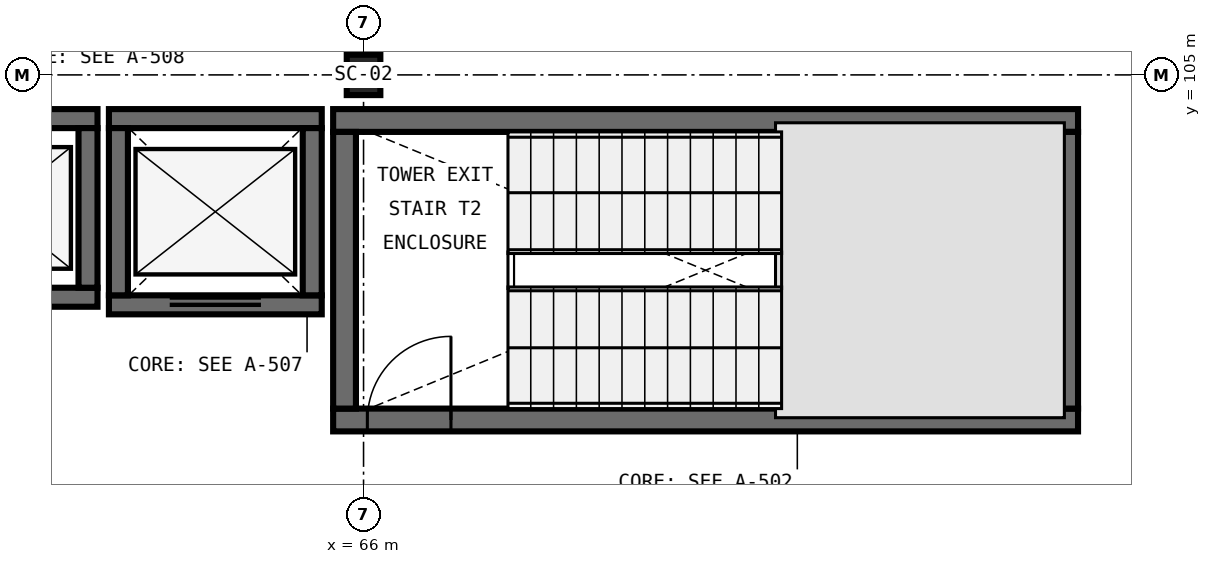
"""IFC4 building model, lengths in metres.
Left out: names, types, materials, properties, quantities, classifications, styles, units other than length and angle.
Written with IfcOpenShell. Run it as: python <this file> out.ifc"""

import sys

from ifc_helpers import new_model, si_unit, direction, frame, frame_2d, origin, origin_2d, place, context, subcontext, project, spatial, rectangle, i_section, extrude, element, fill, save


model = new_model("IFC4")
c1 = context("Model", 3, precision=1e-05, world=origin(), true_north=direction((0.0, 1.0)))
c2 = subcontext(c1, "Body", "Model", "MODEL_VIEW")
j1 = project(units=[si_unit("LENGTHUNIT", "METRE"), si_unit("PLANEANGLEUNIT", "RADIAN")], contexts=[c1])
p1 = place(None, origin())
s1 = spatial("IfcSite", under=j1, at=p1, CompositionType="ELEMENT")
p2 = place(p1, origin())
s2 = spatial("IfcBuilding", under=s1, at=p2, CompositionType="ELEMENT")
p3 = place(p2, frame((0.0, 0.0, 23.4)))
s3 = spatial("IfcBuildingStorey", under=s2, at=p3, CompositionType="ELEMENT", Elevation=23.4)
p4 = place(p3, frame((66.0, 105.0, 0.0), z_axis=(0.0, 0.0, 1.0), x_axis=(1.0, 0.0, 0.0)))
e1 = element("IfcColumn", 1, at=p4, inside=s3, PredefinedType="COLUMN", context=c2, shape_type="SweptSolid", body=[
    extrude(i_section(OverallWidth=0.442, OverallDepth=0.531, WebThickness=0.066, FlangeThickness=0.106, FilletRadius=0.031, at=origin_2d()), origin(), (0.0, 0.0, 1.0), 4.2),
])
p5 = place(p3, frame((65.6, 100.46, 0.0), z_axis=(0.0, 0.0, 1.0), x_axis=(1.0, 0.0, 0.0)))
e2 = element("IfcWall", 2, at=p5, inside=s3, PredefinedType="SHEAR", context=c2, shape_type="SweptSolid", body=[
    extrude(rectangle(XDim=9.8, YDim=0.3, at=frame_2d((4.9, 0.0))), origin(), (0.0, 0.0, 1.0), 4.2),
])
p6 = place(p5, frame((0.45, 0.0, 0.0)))
e3 = element("IfcOpeningElement", 3, at=p6, cuts=e2, PredefinedType="OPENING", context=c2, shape_type="SweptSolid", body=[
    extrude(rectangle(XDim=1.1, YDim=2.2, at=frame_2d((0.55, 1.1))), frame((0.0, 0.165, 0.0), z_axis=(0.0, -1.0, 0.0), x_axis=(1.0, 0.0, 0.0)), (0.0, 0.0, 1.0), 0.33),
])
p7 = place(p3, frame((75.4, 104.4, 0.0), z_axis=(0.0, 0.0, 1.0), x_axis=(-1.0, 0.0, 0.0)))
e4 = element("IfcWall", 4, at=p7, inside=s3, PredefinedType="SHEAR", context=c2, shape_type="SweptSolid", body=[
    extrude(rectangle(XDim=9.8, YDim=0.3, at=frame_2d((4.9, 0.0))), origin(), (0.0, 0.0, 1.0), 4.2),
])
for number, where, z_axis, x_axis in (
    (5, (65.75, 104.25, 0.0), (0.0, 0.0, 1.0), (0.0, -1.0, 0.0)),
    (6, (75.25, 100.61, 0.0), (0.0, 0.0, 1.0), (0.0, 1.0, 0.0)),
):
    element("IfcWall", number, at=place(p3, frame(where, z_axis=z_axis, x_axis=x_axis)), inside=s3, PredefinedType="SHEAR", context=c2, shape_type="SweptSolid", body=[
        extrude(rectangle(XDim=3.64, YDim=0.3, at=frame_2d((1.82, 0.0))), origin(), (0.0, 0.0, 1.0), 4.2),
    ])
p8 = place(p3, frame((62.65, 101.975, 0.0), z_axis=(0.0, 0.0, 1.0), x_axis=(1.0, 0.0, 0.0)))
e7 = element("IfcWall", 7, at=p8, inside=s3, PredefinedType="SHEAR", context=c2, shape_type="SweptSolid", body=[
    extrude(rectangle(XDim=2.8, YDim=0.25, at=frame_2d((1.4, 0.0))), origin(), (0.0, 0.0, 1.0), 4.2),
])
p9 = place(p8, frame((0.8, 0.0, 0.0)))
e8 = element("IfcOpeningElement", 8, at=p9, cuts=e7, PredefinedType="OPENING", context=c2, shape_type="SweptSolid", body=[
    extrude(rectangle(XDim=1.2, YDim=2.2, at=frame_2d((0.6, 1.1))), frame((0.0, 0.14, 0.0), z_axis=(0.0, -1.0, 0.0), x_axis=(1.0, 0.0, 0.0)), (0.0, 0.0, 1.0), 0.28),
])
p10 = place(p3, frame((65.45, 104.425, 0.0), z_axis=(0.0, 0.0, 1.0), x_axis=(-1.0, 0.0, 0.0)))
e9 = element("IfcWall", 9, at=p10, inside=s3, PredefinedType="SHEAR", context=c2, shape_type="SweptSolid", body=[
    extrude(rectangle(XDim=2.8, YDim=0.25, at=frame_2d((1.4, 0.0))), origin(), (0.0, 0.0, 1.0), 4.2),
])
for number, where, z_axis, x_axis in (
    (10, (62.775, 104.3, 0.0), (0.0, 0.0, 1.0), (0.0, -1.0, 0.0)),
    (11, (65.325, 102.1, 0.0), (0.0, 0.0, 1.0), (0.0, 1.0, 0.0)),
):
    element("IfcWall", number, at=place(p3, frame(where, z_axis=z_axis, x_axis=x_axis)), inside=s3, PredefinedType="SHEAR", context=c2, shape_type="SweptSolid", body=[
        extrude(rectangle(XDim=2.2, YDim=0.25, at=frame_2d((1.1, 0.0))), origin(), (0.0, 0.0, 1.0), 4.2),
    ])
p11 = place(p3, frame((59.8, 102.075, 0.0), z_axis=(0.0, 0.0, 1.0), x_axis=(1.0, 0.0, 0.0)))
e12 = element("IfcWall", 12, at=p11, inside=s3, PredefinedType="SHEAR", context=c2, shape_type="SweptSolid", body=[
    extrude(rectangle(XDim=2.7, YDim=0.25, at=frame_2d((1.35, 0.0))), origin(), (0.0, 0.0, 1.0), 4.2),
])
p12 = place(p11, frame((0.8, 0.0, 0.0)))
e13 = element("IfcOpeningElement", 13, at=p12, cuts=e12, PredefinedType="OPENING", context=c2, shape_type="SweptSolid", body=[
    extrude(rectangle(XDim=1.1, YDim=2.2, at=frame_2d((0.55, 1.1))), frame((0.0, 0.14, 0.0), z_axis=(0.0, -1.0, 0.0), x_axis=(1.0, 0.0, 0.0)), (0.0, 0.0, 1.0), 0.28),
])
p13 = place(p3, frame((62.5, 104.425, 0.0), z_axis=(0.0, 0.0, 1.0), x_axis=(-1.0, 0.0, 0.0)))
e14 = element("IfcWall", 14, at=p13, inside=s3, PredefinedType="SHEAR", context=c2, shape_type="SweptSolid", body=[
    extrude(rectangle(XDim=2.7, YDim=0.25, at=frame_2d((1.35, 0.0))), origin(), (0.0, 0.0, 1.0), 4.2),
])
p14 = place(p3, frame((62.375, 102.2, 0.0), z_axis=(0.0, 0.0, 1.0), x_axis=(0.0, 1.0, 0.0)))
e15 = element("IfcWall", 15, at=p14, inside=s3, PredefinedType="SHEAR", context=c2, shape_type="SweptSolid", body=[
    extrude(rectangle(XDim=2.1, YDim=0.25, at=frame_2d((1.05, 0.0))), origin(), (0.0, 0.0, 1.0), 4.2),
])
p15 = place(p6, origin())
e16 = element("IfcDoor", 16, at=p15, inside=s3, OperationType="SINGLE_SWING_RIGHT", PredefinedType="DOOR", context=c2, shape_type="SweptSolid", body=[
    extrude(rectangle(XDim=1.1, YDim=2.2, at=frame_2d((0.55, 1.1))), frame((0.0, 0.025, 0.0), z_axis=(0.0, -1.0, 0.0), x_axis=(1.0, 0.0, 0.0)), (0.0, 0.0, 1.0), 0.05),
])
fill(e3, e16)
p16 = place(p9, origin())
e17 = element("IfcDoor", 17, at=p16, inside=s3, OperationType="DOUBLE_DOOR_SLIDING", PredefinedType="DOOR", context=c2, shape_type="SweptSolid", body=[
    extrude(rectangle(XDim=1.2, YDim=2.2, at=frame_2d((0.6, 1.1))), frame((0.0, 0.025, 0.0), z_axis=(0.0, -1.0, 0.0), x_axis=(1.0, 0.0, 0.0)), (0.0, 0.0, 1.0), 0.05),
])
fill(e8, e17)
save(model, sys.argv[1])
